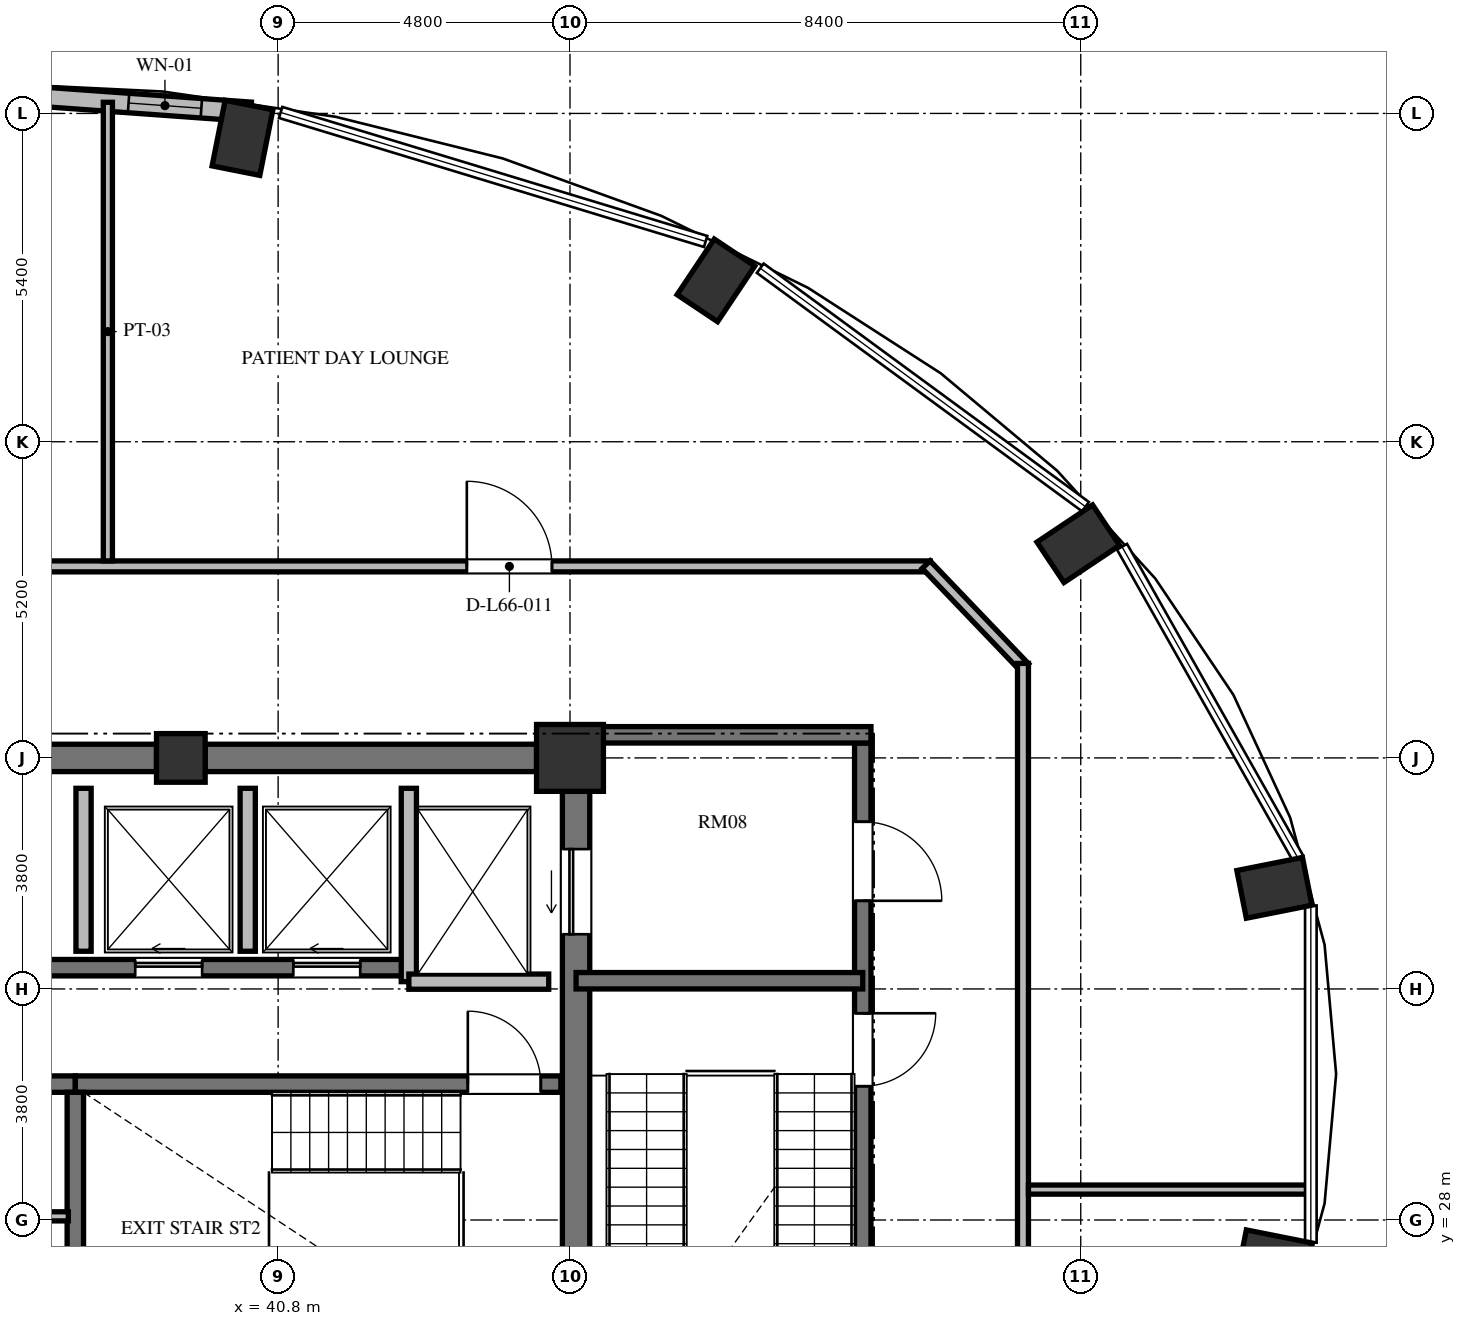
"""IFC4 building model, lengths in metres.
Left out: names, types, materials, properties, quantities, classifications, styles, units other than length and angle.
Written with IfcOpenShell. Run it as: python <this file> out.ifc"""

import sys

from ifc_helpers import new_model, si_unit, direction, frame, frame_2d, origin, origin_2d, place, context, subcontext, project, spatial, rectangle, extrude, element, fill, save


model = new_model("IFC4")
c1 = context("Model", 3, precision=1e-05, world=origin(), true_north=direction((0.0, 1.0)))
c2 = subcontext(c1, "Body", "Model", "MODEL_VIEW")
j1 = project(units=[si_unit("LENGTHUNIT", "METRE"), si_unit("PLANEANGLEUNIT", "RADIAN")], contexts=[c1])
p1 = place(None, origin())
s1 = spatial("IfcSite", under=j1, at=p1, CompositionType="ELEMENT")
p2 = place(p1, origin())
s2 = spatial("IfcBuilding", under=s1, at=p2, CompositionType="ELEMENT")
p3 = place(p2, frame((0.0, 0.0, 255.024)))
s3 = spatial("IfcBuildingStorey", under=s2, at=p3, CompositionType="ELEMENT", Elevation=255.024)
for number, where, z_axis, x_axis in (
    (1, (57.185, 27.337, 0.0), (0.0, 0.0, 1.0), (0.981, -0.195, 0.0)),
    (2, (57.185, 33.463, 0.0), (0.0, 0.0, 1.0), (0.981, 0.195, 0.0)),
    (3, (53.96, 39.123, 0.0), (0.0, 0.0, 1.0), (0.831, 0.556, 0.0)),
    (4, (48.0, 43.454, 0.0), (0.0, 0.0, 1.0), (0.556, 0.831, 0.0)),
    (5, (40.214, 45.798, 0.0), (0.0, 0.0, 1.0), (0.195, 0.981, 0.0)),
):
    element("IfcColumn", number, at=place(p3, frame(where, z_axis=z_axis, x_axis=x_axis)), inside=s3, PredefinedType="COLUMN", context=c2, shape_type="SweptSolid", body=[
        extrude(rectangle(XDim=1.1, YDim=0.8, at=origin_2d()), origin(), (0.0, 0.0, 1.0), 3.648),
    ])
p4 = place(p3, frame((45.6, 35.6, 0.0), z_axis=(0.0, 0.0, 1.0), x_axis=(1.0, 0.0, 0.0)))
e6 = element("IfcColumn", 6, at=p4, inside=s3, PredefinedType="COLUMN", context=c2, shape_type="SweptSolid", body=[
    extrude(rectangle(XDim=1.1, YDim=1.1, at=origin_2d()), origin(), (0.0, 0.0, 1.0), 3.648),
])
p5 = place(p3, frame((39.2, 35.6, 0.0), z_axis=(0.0, 0.0, 1.0), x_axis=(1.0, 0.0, 0.0)))
e7 = element("IfcColumn", 7, at=p5, inside=s3, PredefinedType="COLUMN", context=c2, shape_type="SweptSolid", body=[
    extrude(rectangle(XDim=0.8, YDim=0.8, at=origin_2d()), origin(), (0.0, 0.0, 1.0), 3.648),
])
p6 = place(p3, frame((45.7, 20.95, 0.0), z_axis=(0.0, 0.0, 1.0), x_axis=(0.0, 1.0, 0.0)))
e8 = element("IfcWall", 8, at=p6, inside=s3, PredefinedType="SHEAR", context=c2, shape_type="SweptSolid", body=[
    extrude(rectangle(XDim=14.1, YDim=0.45, at=frame_2d((7.05, 0.0))), origin(), (0.0, 0.0, 1.0), 3.648),
])
p7 = place(p6, frame((11.75, 0.0, 0.0)))
e9 = element("IfcOpeningElement", 9, at=p7, cuts=e8, PredefinedType="OPENING", context=c2, shape_type="SweptSolid", body=[
    extrude(rectangle(XDim=1.4, YDim=2.3, at=frame_2d((0.7, 1.15))), frame((0.0, 0.235, 0.0), z_axis=(0.0, -1.0, 0.0), x_axis=(1.0, 0.0, 0.0)), (0.0, 0.0, 1.0), 0.47),
])
p8 = place(p6, frame((0.95, 0.0, 0.0)))
e10 = element("IfcOpeningElement", 10, at=p8, cuts=e8, PredefinedType="OPENING", context=c2, shape_type="SweptSolid", body=[
    extrude(rectangle(XDim=1.4, YDim=2.3, at=frame_2d((0.7, 1.15))), frame((0.0, 0.235, 0.0), z_axis=(0.0, -1.0, 0.0), x_axis=(1.0, 0.0, 0.0)), (0.0, 0.0, 1.0), 0.47),
])
p9 = place(p3, frame((33.2, 35.6, 0.0), z_axis=(0.0, 0.0, 1.0), x_axis=(1.0, 0.0, 0.0)))
e11 = element("IfcWall", 11, at=p9, inside=s3, PredefinedType="SHEAR", context=c2, shape_type="SweptSolid", body=[
    extrude(rectangle(XDim=5.6, YDim=0.45, at=frame_2d((2.8, 0.0))), origin(), (0.0, 0.0, 1.0), 3.648),
])
p10 = place(p3, frame((39.6, 35.6, 0.0), z_axis=(0.0, 0.0, 1.0), x_axis=(1.0, 0.0, 0.0)))
e12 = element("IfcWall", 12, at=p10, inside=s3, PredefinedType="SHEAR", context=c2, shape_type="SweptSolid", body=[
    extrude(rectangle(XDim=5.45, YDim=0.45, at=frame_2d((2.725, 0.0))), origin(), (0.0, 0.0, 1.0), 3.648),
])
p11 = place(p3, frame((40.35, 46.226, 0.0), z_axis=(0.0, 0.0, 1.0), x_axis=(-0.997409061056, 0.071938619141, 0.0)))
e13 = element("IfcWall", 13, at=p11, inside=s3, PredefinedType="SOLIDWALL", context=c2, shape_type="SweptSolid", body=[
    extrude(rectangle(XDim=4.541, YDim=0.32, at=frame_2d((2.271, 0.0))), origin(), (0.0, 0.0, 1.0), 3.448),
])
p12 = place(p11, frame((0.815, 0.0, 0.85)))
e14 = element("IfcOpeningElement", 14, at=p12, cuts=e13, PredefinedType="OPENING", context=c2, shape_type="SweptSolid", body=[
    extrude(rectangle(XDim=1.2, YDim=2.2, at=frame_2d((0.6, 1.1))), frame((0.0, 0.17, 0.0), z_axis=(0.0, -1.0, 0.0), x_axis=(1.0, 0.0, 0.0)), (0.0, 0.0, 1.0), 0.34),
])
p13 = place(p3, frame((34.535, 30.235, 0.0), z_axis=(0.0, 0.0, 1.0), x_axis=(1.0, 0.0, 0.0)))
e15 = element("IfcWall", 15, at=p13, inside=s3, PredefinedType="SHEAR", context=c2, shape_type="SweptSolid", body=[
    extrude(rectangle(XDim=2.93, YDim=0.27, at=frame_2d((1.465, 0.0))), origin(), (0.0, 0.0, 1.0), 3.648),
])
p14 = place(p13, frame((0.915, 0.0, 0.0)))
e16 = element("IfcOpeningElement", 16, at=p14, cuts=e15, PredefinedType="OPENING", context=c2, shape_type="SweptSolid", body=[
    extrude(rectangle(XDim=1.1, YDim=2.15, at=frame_2d((0.55, 1.075))), frame((0.0, 0.145, 0.0), z_axis=(0.0, -1.0, 0.0), x_axis=(1.0, 0.0, 0.0)), (0.0, 0.0, 1.0), 0.29),
])
p15 = place(p3, frame((37.465, 30.235, 0.0), z_axis=(0.0, 0.0, 1.0), x_axis=(1.0, 0.0, 0.0)))
e17 = element("IfcWall", 17, at=p15, inside=s3, PredefinedType="SHEAR", context=c2, shape_type="SweptSolid", body=[
    extrude(rectangle(XDim=7.985, YDim=0.27, at=frame_2d((3.992, 0.0))), origin(), (0.0, 0.0, 1.0), 3.648),
])
p16 = place(p15, frame((6.455, 0.0, 0.0)))
e18 = element("IfcOpeningElement", 18, at=p16, cuts=e17, PredefinedType="OPENING", context=c2, shape_type="SweptSolid", body=[
    extrude(rectangle(XDim=1.2, YDim=2.15, at=frame_2d((0.6, 1.075))), frame((0.0, 0.145, 0.0), z_axis=(0.0, -1.0, 0.0), x_axis=(1.0, 0.0, 0.0)), (0.0, 0.0, 1.0), 0.29),
])
p17 = place(p3, frame((37.465, 26.02, 0.0), z_axis=(0.0, 0.0, 1.0), x_axis=(0.0, 1.0, 0.0)))
e19 = element("IfcWall", 19, at=p17, inside=s3, PredefinedType="SHEAR", context=c2, shape_type="SweptSolid", body=[
    extrude(rectangle(XDim=4.08, YDim=0.27, at=frame_2d((2.04, 0.0))), origin(), (0.0, 0.0, 1.0), 3.648),
])
p18 = place(p3, frame((34.65, 28.06, 0.0), z_axis=(0.0, 0.0, 1.0), x_axis=(1.0, 0.0, 0.0)))
e20 = element("IfcWall", 20, at=p18, inside=s3, PredefinedType="PARTITIONING", context=c2, shape_type="SweptSolid", body=[
    extrude(rectangle(XDim=2.7, YDim=0.15, at=frame_2d((1.35, 0.0))), origin(), (0.0, 0.0, 1.0), 3.448),
])
p19 = place(p3, frame((26.55, 32.15, 0.0), z_axis=(0.0, 0.0, 1.0), x_axis=(1.0, 0.0, 0.0)))
e21 = element("IfcWall", 21, at=p19, inside=s3, PredefinedType="SHEAR", context=c2, shape_type="SweptSolid", body=[
    extrude(rectangle(XDim=16.4, YDim=0.27, at=frame_2d((8.2, 0.0))), origin(), (0.0, 0.0, 1.0), 3.648),
])
p20 = place(p19, frame((2.175, 0.0, 0.0)))
e22 = element("IfcOpeningElement", 22, at=p20, cuts=e21, PredefinedType="OPENING", context=c2, shape_type="SweptSolid", body=[
    extrude(rectangle(XDim=1.05, YDim=2.15, at=frame_2d((0.525, 1.075))), frame((0.0, 0.145, 0.0), z_axis=(0.0, -1.0, 0.0), x_axis=(1.0, 0.0, 0.0)), (0.0, 0.0, 1.0), 0.29),
])
p21 = place(p19, frame((7.575, 0.0, 0.0)))
e23 = element("IfcOpeningElement", 23, at=p21, cuts=e21, PredefinedType="OPENING", context=c2, shape_type="SweptSolid", body=[
    extrude(rectangle(XDim=1.05, YDim=2.15, at=frame_2d((0.525, 1.075))), frame((0.0, 0.145, 0.0), z_axis=(0.0, -1.0, 0.0), x_axis=(1.0, 0.0, 0.0)), (0.0, 0.0, 1.0), 0.29),
])
p22 = place(p19, frame((11.9, 0.0, 0.0)))
e24 = element("IfcOpeningElement", 24, at=p22, cuts=e21, PredefinedType="OPENING", context=c2, shape_type="SweptSolid", body=[
    extrude(rectangle(XDim=1.1, YDim=2.2, at=frame_2d((0.55, 1.1))), frame((0.0, 0.145, 0.0), z_axis=(0.0, -1.0, 0.0), x_axis=(1.0, 0.0, 0.0)), (0.0, 0.0, 1.0), 0.29),
])
p23 = place(p19, frame((14.5, 0.0, 0.0)))
e25 = element("IfcOpeningElement", 25, at=p23, cuts=e21, PredefinedType="OPENING", context=c2, shape_type="SweptSolid", body=[
    extrude(rectangle(XDim=1.1, YDim=2.2, at=frame_2d((0.55, 1.1))), frame((0.0, 0.145, 0.0), z_axis=(0.0, -1.0, 0.0), x_axis=(1.0, 0.0, 0.0)), (0.0, 0.0, 1.0), 0.29),
])
p24 = place(p3, frame((42.95, 31.92, 0.0), z_axis=(0.0, 0.0, 1.0), x_axis=(0.0, 1.0, 0.0)))
e26 = element("IfcWall", 26, at=p24, inside=s3, PredefinedType="SOLIDWALL", context=c2, shape_type="SweptSolid", body=[
    extrude(rectangle(XDim=3.18, YDim=0.25, at=frame_2d((1.59, 0.0))), origin(), (0.0, 0.0, 1.0), 3.448),
])
p25 = place(p3, frame((42.95, 31.92, 0.0), z_axis=(0.0, 0.0, 1.0), x_axis=(1.0, 0.0, 0.0)))
e27 = element("IfcWall", 27, at=p25, inside=s3, PredefinedType="SOLIDWALL", context=c2, shape_type="SweptSolid", body=[
    extrude(rectangle(XDim=2.3, YDim=0.25, at=frame_2d((1.15, 0.0))), origin(), (0.0, 0.0, 1.0), 3.448),
])
for number, where, z_axis, x_axis in (
    (28, (37.6, 32.42, 0.0), (0.0, 0.0, 1.0), (0.0, 1.0, 0.0)),
    (29, (40.3, 32.42, 0.0), (0.0, 0.0, 1.0), (0.0, 1.0, 0.0)),
):
    element("IfcWall", number, at=place(p3, frame(where, z_axis=z_axis, x_axis=x_axis)), inside=s3, PredefinedType="SOLIDWALL", context=c2, shape_type="SweptSolid", body=[
        extrude(rectangle(XDim=2.68, YDim=0.25, at=frame_2d((1.34, 0.0))), origin(), (0.0, 0.0, 1.0), 3.448),
    ])
p26 = place(p3, frame((50.415, 35.845, 0.0), z_axis=(0.0, 0.0, 1.0), x_axis=(0.0, -1.0, 0.0)))
e30 = element("IfcWall", 30, at=p26, inside=s3, PredefinedType="SHEAR", context=c2, shape_type="SweptSolid", body=[
    extrude(rectangle(XDim=15.825, YDim=0.27, at=frame_2d((7.913, 0.0))), origin(), (0.0, 0.0, 1.0), 3.648),
])
p27 = place(p26, frame((4.445, 0.0, 0.0)))
e31 = element("IfcOpeningElement", 31, at=p27, cuts=e30, PredefinedType="OPENING", context=c2, shape_type="SweptSolid", body=[
    extrude(rectangle(XDim=1.2, YDim=2.15, at=frame_2d((0.6, 1.075))), frame((0.0, 0.145, 0.0), z_axis=(0.0, -1.0, 0.0), x_axis=(1.0, 0.0, 0.0)), (0.0, 0.0, 1.0), 0.29),
])
p28 = place(p26, frame((1.295, 0.0, 0.0)))
e32 = element("IfcOpeningElement", 32, at=p28, cuts=e30, PredefinedType="OPENING", context=c2, shape_type="SweptSolid", body=[
    extrude(rectangle(XDim=1.3, YDim=2.2, at=frame_2d((0.65, 1.1))), frame((0.0, 0.145, 0.0), z_axis=(0.0, -1.0, 0.0), x_axis=(1.0, 0.0, 0.0)), (0.0, 0.0, 1.0), 0.29),
])
p29 = place(p26, frame((13.095, 0.0, 0.0)))
e33 = element("IfcOpeningElement", 33, at=p29, cuts=e30, PredefinedType="OPENING", context=c2, shape_type="SweptSolid", body=[
    extrude(rectangle(XDim=1.3, YDim=2.2, at=frame_2d((0.65, 1.1))), frame((0.0, 0.145, 0.0), z_axis=(0.0, -1.0, 0.0), x_axis=(1.0, 0.0, 0.0)), (0.0, 0.0, 1.0), 0.29),
])
p30 = place(p3, frame((45.925, 35.98, 0.0), z_axis=(0.0, 0.0, 1.0), x_axis=(1.0, 0.0, 0.0)))
e34 = element("IfcWall", 34, at=p30, inside=s3, PredefinedType="SHEAR", context=c2, shape_type="SweptSolid", body=[
    extrude(rectangle(XDim=4.625, YDim=0.27, at=frame_2d((2.312, 0.0))), origin(), (0.0, 0.0, 1.0), 3.648),
])
p31 = place(p3, frame((45.7, 31.935, 0.0), z_axis=(0.0, 0.0, 1.0), x_axis=(1.0, 0.0, 0.0)))
e35 = element("IfcWall", 35, at=p31, inside=s3, PredefinedType="SHEAR", context=c2, shape_type="SweptSolid", body=[
    extrude(rectangle(XDim=4.715, YDim=0.27, at=frame_2d((2.357, 0.0))), origin(), (0.0, 0.0, 1.0), 3.648),
])
p32 = place(p3, frame((30.71, 38.75, 0.0), z_axis=(0.0, 0.0, 1.0), x_axis=(1.0, 0.0, 0.0)))
e36 = element("IfcWall", 36, at=p32, inside=s3, PredefinedType="PARTITIONING", context=c2, shape_type="SweptSolid", body=[
    extrude(rectangle(XDim=20.815, YDim=0.18, at=frame_2d((10.408, 0.0))), origin(), (0.0, 0.0, 1.0), 3.073),
])
p33 = place(p32, frame((13.194, 0.0, 0.0)))
e37 = element("IfcOpeningElement", 37, at=p33, cuts=e36, PredefinedType="OPENING", context=c2, shape_type="SweptSolid", body=[
    extrude(rectangle(XDim=1.4, YDim=2.2, at=frame_2d((0.7, 1.1))), frame((0.0, 0.1, 0.0), z_axis=(0.0, -1.0, 0.0), x_axis=(1.0, 0.0, 0.0)), (0.0, 0.0, 1.0), 0.2),
])
p34 = place(p3, frame((51.458, 38.779, 0.0), z_axis=(0.0, 0.0, 1.0), x_axis=(0.691359830363, -0.722510612352, 0.0)))
e38 = element("IfcWall", 38, at=p34, inside=s3, PredefinedType="PARTITIONING", context=c2, shape_type="SweptSolid", body=[
    extrude(rectangle(XDim=2.343, YDim=0.18, at=frame_2d((1.172, 0.0))), origin(), (0.0, 0.0, 1.0), 3.033),
])
p35 = place(p3, frame((53.05, 37.155, 0.0), z_axis=(0.0, 0.0, 1.0), x_axis=(0.0, -1.0, 0.0)))
e39 = element("IfcWall", 39, at=p35, inside=s3, PredefinedType="PARTITIONING", context=c2, shape_type="SweptSolid", body=[
    extrude(rectangle(XDim=13.509, YDim=0.18, at=frame_2d((6.754, 0.0))), origin(), (0.0, 0.0, 1.0), 3.448),
])
p36 = place(p3, frame((53.14, 28.5, 0.0), z_axis=(0.0, 0.0, 1.0), x_axis=(1.0, 0.0, 0.0)))
e40 = element("IfcWall", 40, at=p36, inside=s3, PredefinedType="PARTITIONING", context=c2, shape_type="SweptSolid", body=[
    extrude(rectangle(XDim=4.632, YDim=0.15, at=frame_2d((2.316, 0.0))), origin(), (0.0, 0.0, 1.0), 3.448),
])
p37 = place(p3, frame((38.0, 38.84, 0.0), z_axis=(0.0, 0.0, 1.0), x_axis=(0.0, 1.0, 0.0)))
e41 = element("IfcWall", 41, at=p37, inside=s3, PredefinedType="PARTITIONING", context=c2, shape_type="SweptSolid", body=[
    extrude(rectangle(XDim=7.543, YDim=0.15, at=frame_2d((3.771, 0.0))), origin(), (0.0, 0.0, 1.0), 3.448),
])
p38 = place(p12, origin())
e42 = element("IfcWindow", 42, at=p38, inside=s3, PartitioningType="SINGLE_PANEL", PredefinedType="WINDOW", context=c2, shape_type="SweptSolid", body=[
    extrude(rectangle(XDim=1.2, YDim=2.2, at=frame_2d((0.6, 1.1))), frame((0.0, 0.03, 0.0), z_axis=(0.0, -1.0, 0.0), x_axis=(1.0, 0.0, 0.0)), (0.0, 0.0, 1.0), 0.06),
])
fill(e14, e42)
p39 = place(p16, origin())
e43 = element("IfcDoor", 43, at=p39, inside=s3, OperationType="SINGLE_SWING_LEFT", PredefinedType="DOOR", context=c2, shape_type="SweptSolid", body=[
    extrude(rectangle(XDim=1.2, YDim=2.15, at=frame_2d((0.6, 1.075))), frame((0.0, 0.025, 0.0), z_axis=(0.0, -1.0, 0.0), x_axis=(1.0, 0.0, 0.0)), (0.0, 0.0, 1.0), 0.05),
])
fill(e18, e43)
p40 = place(p22, origin())
e44 = element("IfcDoor", 44, at=p40, inside=s3, OperationType="SLIDING_TO_LEFT", PredefinedType="DOOR", context=c2, shape_type="SweptSolid", body=[
    extrude(rectangle(XDim=1.1, YDim=2.2, at=frame_2d((0.55, 1.1))), frame((0.0, 0.025, 0.0), z_axis=(0.0, -1.0, 0.0), x_axis=(1.0, 0.0, 0.0)), (0.0, 0.0, 1.0), 0.05),
])
fill(e24, e44)
p41 = place(p23, origin())
e45 = element("IfcDoor", 45, at=p41, inside=s3, OperationType="SLIDING_TO_LEFT", PredefinedType="DOOR", context=c2, shape_type="SweptSolid", body=[
    extrude(rectangle(XDim=1.1, YDim=2.2, at=frame_2d((0.55, 1.1))), frame((0.0, 0.025, 0.0), z_axis=(0.0, -1.0, 0.0), x_axis=(1.0, 0.0, 0.0)), (0.0, 0.0, 1.0), 0.05),
])
fill(e25, e45)
p42 = place(p7, origin())
e46 = element("IfcDoor", 46, at=p42, inside=s3, OperationType="SLIDING_TO_LEFT", PredefinedType="DOOR", context=c2, shape_type="SweptSolid", body=[
    extrude(rectangle(XDim=1.4, YDim=2.3, at=frame_2d((0.7, 1.15))), frame((0.0, 0.025, 0.0), z_axis=(0.0, -1.0, 0.0), x_axis=(1.0, 0.0, 0.0)), (0.0, 0.0, 1.0), 0.05),
])
fill(e9, e46)
p43 = place(p27, origin())
e47 = element("IfcDoor", 47, at=p43, inside=s3, OperationType="SINGLE_SWING_LEFT", PredefinedType="DOOR", context=c2, shape_type="SweptSolid", body=[
    extrude(rectangle(XDim=1.2, YDim=2.15, at=frame_2d((0.6, 1.075))), frame((0.0, 0.025, 0.0), z_axis=(0.0, -1.0, 0.0), x_axis=(1.0, 0.0, 0.0)), (0.0, 0.0, 1.0), 0.05),
])
fill(e31, e47)
p44 = place(p28, origin())
e48 = element("IfcDoor", 48, at=p44, inside=s3, OperationType="SINGLE_SWING_RIGHT", PredefinedType="DOOR", context=c2, shape_type="SweptSolid", body=[
    extrude(rectangle(XDim=1.3, YDim=2.2, at=frame_2d((0.65, 1.1))), frame((0.0, 0.025, 0.0), z_axis=(0.0, -1.0, 0.0), x_axis=(1.0, 0.0, 0.0)), (0.0, 0.0, 1.0), 0.05),
])
fill(e32, e48)
p45 = place(p33, origin())
e49 = element("IfcDoor", 49, at=p45, inside=s3, OperationType="SINGLE_SWING_LEFT", PredefinedType="DOOR", context=c2, shape_type="SweptSolid", body=[
    extrude(rectangle(XDim=1.4, YDim=2.2, at=frame_2d((0.7, 1.1))), frame((0.0, 0.025, 0.0), z_axis=(0.0, -1.0, 0.0), x_axis=(1.0, 0.0, 0.0)), (0.0, 0.0, 1.0), 0.05),
])
fill(e37, e49)
save(model, sys.argv[1])
